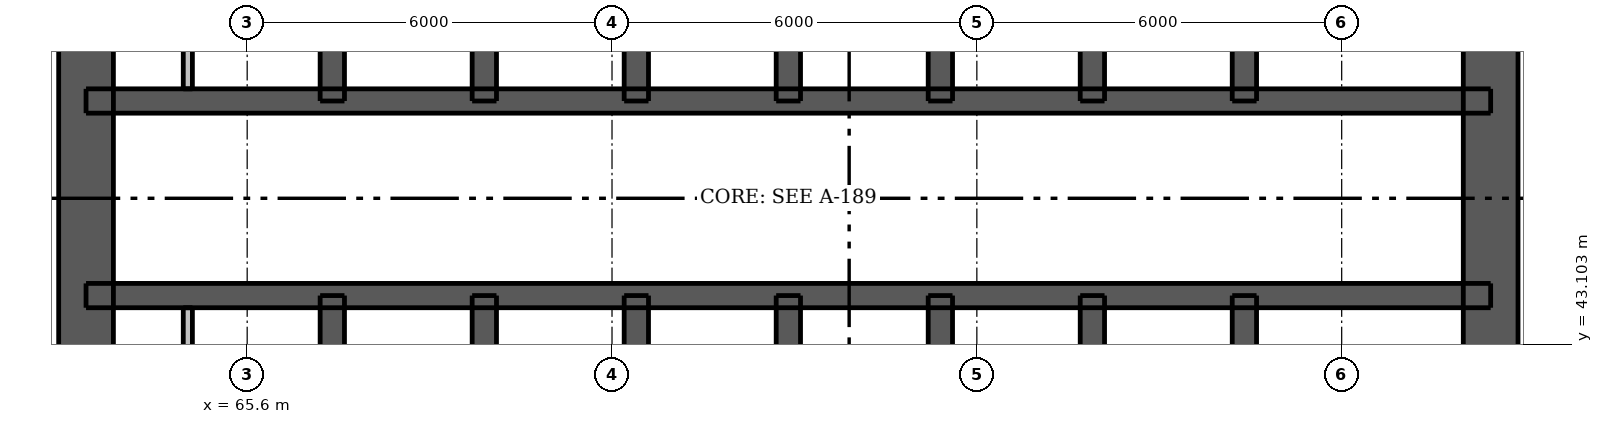
"""IFC4 building model, lengths in metres.
Left out: names, types, materials, properties, quantities, classifications, styles, units other than length and angle.
Written with IfcOpenShell. Run it as: python <this file> out.ifc"""

import sys

from ifc_helpers import new_model, si_unit, direction, frame, frame_2d, origin, place, context, subcontext, project, spatial, rectangle, extrude, element, fill, save


model = new_model("IFC4")
c1 = context("Model", 3, precision=1e-05, world=origin(), true_north=direction((0.0, 1.0)))
c2 = subcontext(c1, "Body", "Model", "MODEL_VIEW")
j1 = project(units=[si_unit("LENGTHUNIT", "METRE"), si_unit("PLANEANGLEUNIT", "RADIAN")], contexts=[c1])
p1 = place(None, origin())
s1 = spatial("IfcSite", under=j1, at=p1, CompositionType="ELEMENT")
p2 = place(p1, origin())
s2 = spatial("IfcBuilding", under=s1, at=p2, CompositionType="ELEMENT")
p3 = place(p2, frame((0.0, 0.0, 63.1)))
s3 = spatial("IfcBuildingStorey", under=s2, at=p3, CompositionType="ELEMENT", Elevation=63.1)
p4 = place(p3, frame((62.95, 33.5, 0.0), z_axis=(0.0, 0.0, 1.0), x_axis=(0.0, 1.0, 0.0)))
e1 = element("IfcWall", 1, at=p4, inside=s3, PredefinedType="SHEAR", context=c2, shape_type="SweptSolid", body=[
    extrude(rectangle(XDim=24.0, YDim=0.9, at=frame_2d((12.0, 0.0))), origin(), (0.0, 0.0, 1.0), 3.05),
])
p5 = place(p4, frame((11.2, 0.0, 0.0)))
e2 = element("IfcOpeningElement", 2, at=p5, cuts=e1, PredefinedType="OPENING", context=c2, shape_type="SweptSolid", body=[
    extrude(rectangle(XDim=1.6, YDim=2.1, at=frame_2d((0.8, 1.05))), frame((0.0, 0.46, 0.0), z_axis=(0.0, -1.0, 0.0), x_axis=(1.0, 0.0, 0.0)), (0.0, 0.0, 1.0), 0.92),
])
p6 = place(p3, frame((86.05, 33.5, 0.0), z_axis=(0.0, 0.0, 1.0), x_axis=(0.0, 1.0, 0.0)))
e3 = element("IfcWall", 3, at=p6, inside=s3, PredefinedType="SHEAR", context=c2, shape_type="SweptSolid", body=[
    extrude(rectangle(XDim=24.0, YDim=0.9, at=frame_2d((12.0, 0.0))), origin(), (0.0, 0.0, 1.0), 3.05),
])
p7 = place(p6, frame((11.2, 0.0, 0.0)))
e4 = element("IfcOpeningElement", 4, at=p7, cuts=e3, PredefinedType="OPENING", context=c2, shape_type="SweptSolid", body=[
    extrude(rectangle(XDim=1.6, YDim=2.1, at=frame_2d((0.8, 1.05))), frame((0.0, 0.46, 0.0), z_axis=(0.0, -1.0, 0.0), x_axis=(1.0, 0.0, 0.0)), (0.0, 0.0, 1.0), 0.92),
])
p8 = place(p3, frame((62.95, 43.9, 0.0), z_axis=(0.0, 0.0, 1.0), x_axis=(1.0, 0.0, 0.0)))
e5 = element("IfcWall", 5, at=p8, inside=s3, PredefinedType="SHEAR", context=c2, shape_type="SweptSolid", body=[
    extrude(rectangle(XDim=23.1, YDim=0.4, at=frame_2d((11.55, 0.0))), origin(), (0.0, 0.0, 1.0), 3.05),
])
p9 = place(p8, frame((0.662, 0.0, 0.0)))
e6 = element("IfcOpeningElement", 6, at=p9, cuts=e5, PredefinedType="OPENING", context=c2, shape_type="SweptSolid", body=[
    extrude(rectangle(XDim=0.8, YDim=2.1, at=frame_2d((0.4, 1.05))), frame((0.0, 0.21, 0.0), z_axis=(0.0, -1.0, 0.0), x_axis=(1.0, 0.0, 0.0)), (0.0, 0.0, 1.0), 0.42),
])
p10 = place(p8, frame((2.312, 0.0, 0.0)))
e7 = element("IfcOpeningElement", 7, at=p10, cuts=e5, PredefinedType="OPENING", context=c2, shape_type="SweptSolid", body=[
    extrude(rectangle(XDim=0.9, YDim=2.1, at=frame_2d((0.45, 1.05))), frame((0.0, 0.21, 0.0), z_axis=(0.0, -1.0, 0.0), x_axis=(1.0, 0.0, 0.0)), (0.0, 0.0, 1.0), 0.42),
])
p11 = place(p8, frame((20.5, 0.0, 0.0)))
e8 = element("IfcOpeningElement", 8, at=p11, cuts=e5, PredefinedType="OPENING", context=c2, shape_type="SweptSolid", body=[
    extrude(rectangle(XDim=0.9, YDim=2.1, at=frame_2d((0.45, 1.05))), frame((0.0, 0.21, 0.0), z_axis=(0.0, -1.0, 0.0), x_axis=(1.0, 0.0, 0.0)), (0.0, 0.0, 1.0), 0.42),
])
p12 = place(p8, frame((4.75, 0.0, 0.0)))
e9 = element("IfcOpeningElement", 9, at=p12, cuts=e5, PredefinedType="OPENING", context=c2, shape_type="SweptSolid", body=[
    extrude(rectangle(XDim=1.1, YDim=2.1, at=frame_2d((0.55, 1.05))), frame((0.0, 0.21, 0.0), z_axis=(0.0, -1.0, 0.0), x_axis=(1.0, 0.0, 0.0)), (0.0, 0.0, 1.0), 0.42),
])
p13 = place(p8, frame((7.25, 0.0, 0.0)))
e10 = element("IfcOpeningElement", 10, at=p13, cuts=e5, PredefinedType="OPENING", context=c2, shape_type="SweptSolid", body=[
    extrude(rectangle(XDim=1.1, YDim=2.1, at=frame_2d((0.55, 1.05))), frame((0.0, 0.21, 0.0), z_axis=(0.0, -1.0, 0.0), x_axis=(1.0, 0.0, 0.0)), (0.0, 0.0, 1.0), 0.42),
])
p14 = place(p8, frame((9.75, 0.0, 0.0)))
e11 = element("IfcOpeningElement", 11, at=p14, cuts=e5, PredefinedType="OPENING", context=c2, shape_type="SweptSolid", body=[
    extrude(rectangle(XDim=1.1, YDim=2.1, at=frame_2d((0.55, 1.05))), frame((0.0, 0.21, 0.0), z_axis=(0.0, -1.0, 0.0), x_axis=(1.0, 0.0, 0.0)), (0.0, 0.0, 1.0), 0.42),
])
p15 = place(p8, frame((12.25, 0.0, 0.0)))
e12 = element("IfcOpeningElement", 12, at=p15, cuts=e5, PredefinedType="OPENING", context=c2, shape_type="SweptSolid", body=[
    extrude(rectangle(XDim=1.1, YDim=2.1, at=frame_2d((0.55, 1.05))), frame((0.0, 0.21, 0.0), z_axis=(0.0, -1.0, 0.0), x_axis=(1.0, 0.0, 0.0)), (0.0, 0.0, 1.0), 0.42),
])
p16 = place(p8, frame((14.75, 0.0, 0.0)))
e13 = element("IfcOpeningElement", 13, at=p16, cuts=e5, PredefinedType="OPENING", context=c2, shape_type="SweptSolid", body=[
    extrude(rectangle(XDim=1.1, YDim=2.1, at=frame_2d((0.55, 1.05))), frame((0.0, 0.21, 0.0), z_axis=(0.0, -1.0, 0.0), x_axis=(1.0, 0.0, 0.0)), (0.0, 0.0, 1.0), 0.42),
])
p17 = place(p8, frame((17.25, 0.0, 0.0)))
e14 = element("IfcOpeningElement", 14, at=p17, cuts=e5, PredefinedType="OPENING", context=c2, shape_type="SweptSolid", body=[
    extrude(rectangle(XDim=1.1, YDim=2.1, at=frame_2d((0.55, 1.05))), frame((0.0, 0.21, 0.0), z_axis=(0.0, -1.0, 0.0), x_axis=(1.0, 0.0, 0.0)), (0.0, 0.0, 1.0), 0.42),
])
p18 = place(p3, frame((62.95, 47.1, 0.0), z_axis=(0.0, 0.0, 1.0), x_axis=(1.0, 0.0, 0.0)))
e15 = element("IfcWall", 15, at=p18, inside=s3, PredefinedType="SHEAR", context=c2, shape_type="SweptSolid", body=[
    extrude(rectangle(XDim=23.1, YDim=0.4, at=frame_2d((11.55, 0.0))), origin(), (0.0, 0.0, 1.0), 3.05),
])
p19 = place(p18, frame((0.662, 0.0, 0.0)))
e16 = element("IfcOpeningElement", 16, at=p19, cuts=e15, PredefinedType="OPENING", context=c2, shape_type="SweptSolid", body=[
    extrude(rectangle(XDim=0.8, YDim=2.1, at=frame_2d((0.4, 1.05))), frame((0.0, 0.21, 0.0), z_axis=(0.0, -1.0, 0.0), x_axis=(1.0, 0.0, 0.0)), (0.0, 0.0, 1.0), 0.42),
])
p20 = place(p18, frame((2.312, 0.0, 0.0)))
e17 = element("IfcOpeningElement", 17, at=p20, cuts=e15, PredefinedType="OPENING", context=c2, shape_type="SweptSolid", body=[
    extrude(rectangle(XDim=0.9, YDim=2.1, at=frame_2d((0.45, 1.05))), frame((0.0, 0.21, 0.0), z_axis=(0.0, -1.0, 0.0), x_axis=(1.0, 0.0, 0.0)), (0.0, 0.0, 1.0), 0.42),
])
p21 = place(p18, frame((20.5, 0.0, 0.0)))
e18 = element("IfcOpeningElement", 18, at=p21, cuts=e15, PredefinedType="OPENING", context=c2, shape_type="SweptSolid", body=[
    extrude(rectangle(XDim=0.9, YDim=2.1, at=frame_2d((0.45, 1.05))), frame((0.0, 0.21, 0.0), z_axis=(0.0, -1.0, 0.0), x_axis=(1.0, 0.0, 0.0)), (0.0, 0.0, 1.0), 0.42),
])
p22 = place(p3, frame((67.0, 33.95, 0.0), z_axis=(0.0, 0.0, 1.0), x_axis=(0.0, 1.0, 0.0)))
e19 = element("IfcWall", 19, at=p22, inside=s3, PredefinedType="SHEAR", context=c2, shape_type="SweptSolid", body=[
    extrude(rectangle(XDim=9.95, YDim=0.4, at=frame_2d((4.975, 0.0))), origin(), (0.0, 0.0, 1.0), 3.05),
])
p23 = place(p22, frame((0.65, 0.0, 0.0)))
e20 = element("IfcOpeningElement", 20, at=p23, cuts=e19, PredefinedType="OPENING", context=c2, shape_type="SweptSolid", body=[
    extrude(rectangle(XDim=1.1, YDim=2.1, at=frame_2d((0.55, 1.05))), frame((0.0, 0.21, 0.0), z_axis=(0.0, -1.0, 0.0), x_axis=(1.0, 0.0, 0.0)), (0.0, 0.0, 1.0), 0.42),
])
for number, where, z_axis, x_axis in (
    (21, (67.0, 47.1, 0.0), (0.0, 0.0, 1.0), (0.0, 1.0, 0.0)),
    (22, (82.0, 33.95, 0.0), (0.0, 0.0, 1.0), (0.0, 1.0, 0.0)),
    (23, (82.0, 47.1, 0.0), (0.0, 0.0, 1.0), (0.0, 1.0, 0.0)),
):
    element("IfcWall", number, at=place(p3, frame(where, z_axis=z_axis, x_axis=x_axis)), inside=s3, PredefinedType="SHEAR", context=c2, shape_type="SweptSolid", body=[
        extrude(rectangle(XDim=9.95, YDim=0.4, at=frame_2d((4.975, 0.0))), origin(), (0.0, 0.0, 1.0), 3.05),
    ])
for number, where, z_axis, x_axis in (
    (24, (69.5, 41.0, 0.0), (0.0, 0.0, 1.0), (0.0, 1.0, 0.0)),
    (25, (69.5, 47.1, 0.0), (0.0, 0.0, 1.0), (0.0, 1.0, 0.0)),
    (26, (72.0, 41.0, 0.0), (0.0, 0.0, 1.0), (0.0, 1.0, 0.0)),
    (27, (72.0, 47.1, 0.0), (0.0, 0.0, 1.0), (0.0, 1.0, 0.0)),
    (28, (74.5, 41.0, 0.0), (0.0, 0.0, 1.0), (0.0, 1.0, 0.0)),
    (29, (74.5, 47.1, 0.0), (0.0, 0.0, 1.0), (0.0, 1.0, 0.0)),
    (30, (77.0, 41.0, 0.0), (0.0, 0.0, 1.0), (0.0, 1.0, 0.0)),
    (31, (77.0, 47.1, 0.0), (0.0, 0.0, 1.0), (0.0, 1.0, 0.0)),
    (32, (79.5, 41.0, 0.0), (0.0, 0.0, 1.0), (0.0, 1.0, 0.0)),
    (33, (79.5, 47.1, 0.0), (0.0, 0.0, 1.0), (0.0, 1.0, 0.0)),
):
    element("IfcWall", number, at=place(p3, frame(where, z_axis=z_axis, x_axis=x_axis)), inside=s3, PredefinedType="SHEAR", context=c2, shape_type="SweptSolid", body=[
        extrude(rectangle(XDim=2.9, YDim=0.4, at=frame_2d((1.45, 0.0))), origin(), (0.0, 0.0, 1.0), 3.05),
    ])
for number, where, z_axis, x_axis in (
    (34, (64.624, 41.2, 0.0), (0.0, 0.0, 1.0), (0.0, 1.0, 0.0)),
    (35, (64.624, 47.3, 0.0), (0.0, 0.0, 1.0), (0.0, 1.0, 0.0)),
):
    element("IfcWall", number, at=place(p3, frame(where, z_axis=z_axis, x_axis=x_axis)), inside=s3, PredefinedType="PLUMBINGWALL", context=c2, shape_type="SweptSolid", body=[
        extrude(rectangle(XDim=2.5, YDim=0.15, at=frame_2d((1.25, 0.0))), origin(), (0.0, 0.0, 1.0), 3.05),
    ])
p24 = place(p5, origin())
e36 = element("IfcDoor", 36, at=p24, inside=s3, OperationType="DOUBLE_DOOR_SINGLE_SWING", PredefinedType="DOOR", context=c2, shape_type="SweptSolid", body=[
    extrude(rectangle(XDim=1.6, YDim=2.1, at=frame_2d((0.8, 1.05))), frame((0.0, -0.388, 0.0), z_axis=(0.0, -1.0, 0.0), x_axis=(1.0, 0.0, 0.0)), (0.0, 0.0, 1.0), 0.05),
])
fill(e2, e36)
p25 = place(p7, origin())
e37 = element("IfcDoor", 37, at=p25, inside=s3, OperationType="DOUBLE_DOOR_SINGLE_SWING", PredefinedType="DOOR", context=c2, shape_type="SweptSolid", body=[
    extrude(rectangle(XDim=1.6, YDim=2.1, at=frame_2d((0.8, 1.05))), frame((0.0, 0.438, 0.0), z_axis=(0.0, -1.0, 0.0), x_axis=(1.0, 0.0, 0.0)), (0.0, 0.0, 1.0), 0.05),
])
fill(e4, e37)
p26 = place(p9, origin())
e38 = element("IfcDoor", 38, at=p26, inside=s3, OperationType="SINGLE_SWING_LEFT", PredefinedType="DOOR", context=c2, shape_type="SweptSolid", body=[
    extrude(rectangle(XDim=0.8, YDim=2.1, at=frame_2d((0.4, 1.05))), frame((0.0, -0.138, 0.0), z_axis=(0.0, -1.0, 0.0), x_axis=(1.0, 0.0, 0.0)), (0.0, 0.0, 1.0), 0.05),
])
fill(e6, e38)
p27 = place(p10, origin())
e39 = element("IfcDoor", 39, at=p27, inside=s3, OperationType="SINGLE_SWING_RIGHT", PredefinedType="DOOR", context=c2, shape_type="SweptSolid", body=[
    extrude(rectangle(XDim=0.9, YDim=2.1, at=frame_2d((0.45, 1.05))), frame((0.0, -0.138, 0.0), z_axis=(0.0, -1.0, 0.0), x_axis=(1.0, 0.0, 0.0)), (0.0, 0.0, 1.0), 0.05),
])
fill(e7, e39)
p28 = place(p11, origin())
e40 = element("IfcDoor", 40, at=p28, inside=s3, OperationType="SINGLE_SWING_LEFT", PredefinedType="DOOR", context=c2, shape_type="SweptSolid", body=[
    extrude(rectangle(XDim=0.9, YDim=2.1, at=frame_2d((0.45, 1.05))), frame((0.0, -0.138, 0.0), z_axis=(0.0, -1.0, 0.0), x_axis=(1.0, 0.0, 0.0)), (0.0, 0.0, 1.0), 0.05),
])
fill(e8, e40)
p29 = place(p19, origin())
e41 = element("IfcDoor", 41, at=p29, inside=s3, OperationType="SINGLE_SWING_LEFT", PredefinedType="DOOR", context=c2, shape_type="SweptSolid", body=[
    extrude(rectangle(XDim=0.8, YDim=2.1, at=frame_2d((0.4, 1.05))), frame((0.0, 0.188, 0.0), z_axis=(0.0, -1.0, 0.0), x_axis=(1.0, 0.0, 0.0)), (0.0, 0.0, 1.0), 0.05),
])
fill(e16, e41)
p30 = place(p20, origin())
e42 = element("IfcDoor", 42, at=p30, inside=s3, OperationType="SINGLE_SWING_RIGHT", PredefinedType="DOOR", context=c2, shape_type="SweptSolid", body=[
    extrude(rectangle(XDim=0.9, YDim=2.1, at=frame_2d((0.45, 1.05))), frame((0.0, 0.188, 0.0), z_axis=(0.0, -1.0, 0.0), x_axis=(1.0, 0.0, 0.0)), (0.0, 0.0, 1.0), 0.05),
])
fill(e17, e42)
p31 = place(p21, origin())
e43 = element("IfcDoor", 43, at=p31, inside=s3, OperationType="SINGLE_SWING_LEFT", PredefinedType="DOOR", context=c2, shape_type="SweptSolid", body=[
    extrude(rectangle(XDim=0.9, YDim=2.1, at=frame_2d((0.45, 1.05))), frame((0.0, 0.188, 0.0), z_axis=(0.0, -1.0, 0.0), x_axis=(1.0, 0.0, 0.0)), (0.0, 0.0, 1.0), 0.05),
])
fill(e18, e43)
p32 = place(p12, origin())
e44 = element("IfcDoor", 44, at=p32, inside=s3, OperationType="DOUBLE_DOOR_SLIDING", PredefinedType="DOOR", context=c2, shape_type="SweptSolid", body=[
    extrude(rectangle(XDim=1.1, YDim=2.1, at=frame_2d((0.55, 1.05))), frame((0.0, 0.025, 0.0), z_axis=(0.0, -1.0, 0.0), x_axis=(1.0, 0.0, 0.0)), (0.0, 0.0, 1.0), 0.05),
])
fill(e9, e44)
p33 = place(p13, origin())
e45 = element("IfcDoor", 45, at=p33, inside=s3, OperationType="DOUBLE_DOOR_SLIDING", PredefinedType="DOOR", context=c2, shape_type="SweptSolid", body=[
    extrude(rectangle(XDim=1.1, YDim=2.1, at=frame_2d((0.55, 1.05))), frame((0.0, 0.025, 0.0), z_axis=(0.0, -1.0, 0.0), x_axis=(1.0, 0.0, 0.0)), (0.0, 0.0, 1.0), 0.05),
])
fill(e10, e45)
p34 = place(p14, origin())
e46 = element("IfcDoor", 46, at=p34, inside=s3, OperationType="DOUBLE_DOOR_SLIDING", PredefinedType="DOOR", context=c2, shape_type="SweptSolid", body=[
    extrude(rectangle(XDim=1.1, YDim=2.1, at=frame_2d((0.55, 1.05))), frame((0.0, 0.025, 0.0), z_axis=(0.0, -1.0, 0.0), x_axis=(1.0, 0.0, 0.0)), (0.0, 0.0, 1.0), 0.05),
])
fill(e11, e46)
p35 = place(p15, origin())
e47 = element("IfcDoor", 47, at=p35, inside=s3, OperationType="DOUBLE_DOOR_SLIDING", PredefinedType="DOOR", context=c2, shape_type="SweptSolid", body=[
    extrude(rectangle(XDim=1.1, YDim=2.1, at=frame_2d((0.55, 1.05))), frame((0.0, 0.025, 0.0), z_axis=(0.0, -1.0, 0.0), x_axis=(1.0, 0.0, 0.0)), (0.0, 0.0, 1.0), 0.05),
])
fill(e12, e47)
p36 = place(p16, origin())
e48 = element("IfcDoor", 48, at=p36, inside=s3, OperationType="DOUBLE_DOOR_SLIDING", PredefinedType="DOOR", context=c2, shape_type="SweptSolid", body=[
    extrude(rectangle(XDim=1.1, YDim=2.1, at=frame_2d((0.55, 1.05))), frame((0.0, 0.025, 0.0), z_axis=(0.0, -1.0, 0.0), x_axis=(1.0, 0.0, 0.0)), (0.0, 0.0, 1.0), 0.05),
])
fill(e13, e48)
p37 = place(p17, origin())
e49 = element("IfcDoor", 49, at=p37, inside=s3, OperationType="DOUBLE_DOOR_SLIDING", PredefinedType="DOOR", context=c2, shape_type="SweptSolid", body=[
    extrude(rectangle(XDim=1.1, YDim=2.1, at=frame_2d((0.55, 1.05))), frame((0.0, 0.025, 0.0), z_axis=(0.0, -1.0, 0.0), x_axis=(1.0, 0.0, 0.0)), (0.0, 0.0, 1.0), 0.05),
])
fill(e14, e49)
save(model, sys.argv[1])
